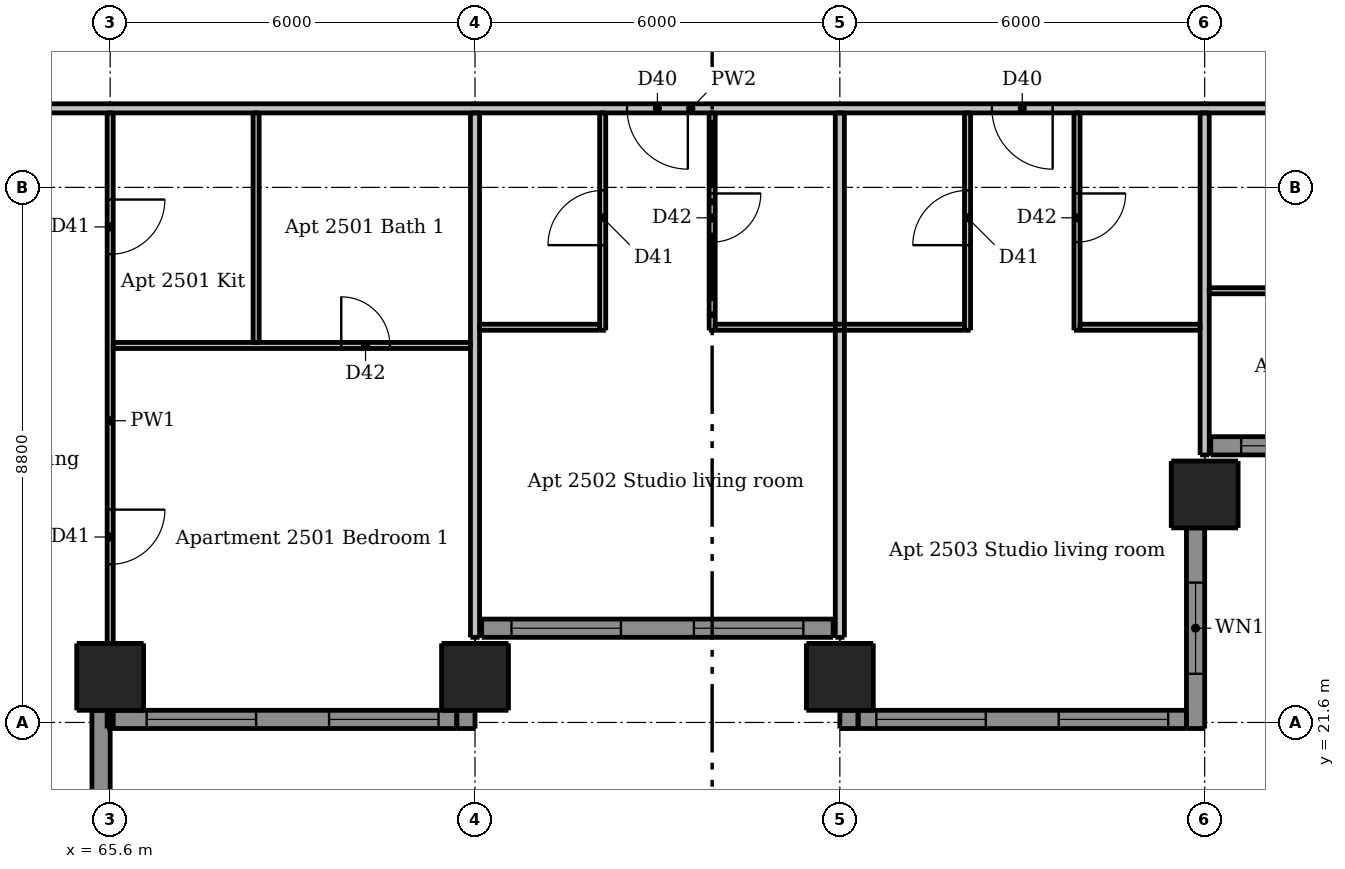
"""IFC4 building model, lengths in metres.
Left out: names, types, materials, properties, quantities, classifications, styles, units other than length and angle.
Written with IfcOpenShell. Run it as: python <this file> out.ifc"""

import sys

from ifc_helpers import new_model, si_unit, direction, frame, frame_2d, origin, origin_2d, place, context, subcontext, project, spatial, rectangle, extrude, element, fill, save


model = new_model("IFC4")
c1 = context("Model", 3, precision=1e-05, world=origin(), true_north=direction((0.0, 1.0)))
c2 = subcontext(c1, "Body", "Model", "MODEL_VIEW")
j1 = project(units=[si_unit("LENGTHUNIT", "METRE"), si_unit("PLANEANGLEUNIT", "RADIAN")], contexts=[c1])
p1 = place(None, origin())
s1 = spatial("IfcSite", under=j1, at=p1, CompositionType="ELEMENT")
p2 = place(p1, origin())
s2 = spatial("IfcBuilding", under=s1, at=p2, CompositionType="ELEMENT")
p3 = place(p2, frame((0.0, 0.0, 95.2)))
s3 = spatial("IfcBuildingStorey", under=s2, at=p3, CompositionType="ELEMENT", Elevation=95.2)
for number, where, z_axis, x_axis in (
    (1, (65.6, 22.35, 0.0), (0.0, 0.0, 1.0), (1.0, 0.0, 0.0)),
    (2, (71.6, 22.35, 0.0), (0.0, 0.0, 1.0), (1.0, 0.0, 0.0)),
    (3, (77.6, 22.35, 0.0), (0.0, 0.0, 1.0), (1.0, 0.0, 0.0)),
    (4, (83.6, 25.35, 0.0), (0.0, 0.0, 1.0), (1.0, 0.0, 0.0)),
):
    element("IfcColumn", number, at=place(p3, frame(where, z_axis=z_axis, x_axis=x_axis)), inside=s3, PredefinedType="COLUMN", context=c2, shape_type="SweptSolid", body=[
        extrude(rectangle(XDim=1.1, YDim=1.1, at=origin_2d()), origin(), (0.0, 0.0, 1.0), 3.05),
    ])
p4 = place(p3, frame((65.45, 20.0, 0.0), z_axis=(0.0, 0.0, 1.0), x_axis=(0.0, 1.0, 0.0)))
e5 = element("IfcWall", 5, at=p4, inside=s3, PredefinedType="SOLIDWALL", context=c2, shape_type="SweptSolid", body=[
    extrude(rectangle(XDim=1.8, YDim=0.3, at=frame_2d((0.9, 0.0))), origin(), (0.0, 0.0, 1.0), 3.05),
])
for number, where, z_axis, x_axis in (
    (6, (71.45, 21.5, 0.0), (0.0, 0.0, 1.0), (0.0, 1.0, 0.0)),
    (7, (77.75, 21.8, 0.0), (0.0, 0.0, 1.0), (0.0, -1.0, 0.0)),
):
    element("IfcWall", number, at=place(p3, frame(where, z_axis=z_axis, x_axis=x_axis)), inside=s3, PredefinedType="SOLIDWALL", context=c2, shape_type="SweptSolid", body=[
        extrude(rectangle(XDim=0.3, YDim=0.3, at=frame_2d((0.15, 0.0))), origin(), (0.0, 0.0, 1.0), 3.05),
    ])
p5 = place(p3, frame((83.45, 21.5, 0.0), z_axis=(0.0, 0.0, 1.0), x_axis=(0.0, 1.0, 0.0)))
e8 = element("IfcWall", 8, at=p5, inside=s3, PredefinedType="SOLIDWALL", context=c2, shape_type="SweptSolid", body=[
    extrude(rectangle(XDim=3.3, YDim=0.3, at=frame_2d((1.65, 0.0))), origin(), (0.0, 0.0, 1.0), 3.05),
])
p6 = place(p5, frame((0.9, 0.0, 0.9)))
e9 = element("IfcOpeningElement", 9, at=p6, cuts=e8, PredefinedType="OPENING", context=c2, shape_type="SweptSolid", body=[
    extrude(rectangle(XDim=1.5, YDim=1.5, at=frame_2d((0.75, 0.75))), frame((0.0, 0.16, 0.0), z_axis=(0.0, -1.0, 0.0), x_axis=(1.0, 0.0, 0.0)), (0.0, 0.0, 1.0), 0.32),
])
p7 = place(p3, frame((65.6, 21.65, 0.0), z_axis=(0.0, 0.0, 1.0), x_axis=(1.0, 0.0, 0.0)))
e10 = element("IfcWall", 10, at=p7, inside=s3, PredefinedType="SOLIDWALL", context=c2, shape_type="SweptSolid", body=[
    extrude(rectangle(XDim=5.7, YDim=0.3, at=frame_2d((2.85, 0.0))), origin(), (0.0, 0.0, 1.0), 3.05),
])
p8 = place(p7, frame((0.6, 0.0, 0.15)))
e11 = element("IfcOpeningElement", 11, at=p8, cuts=e10, PredefinedType="OPENING", context=c2, shape_type="SweptSolid", body=[
    extrude(rectangle(XDim=1.8, YDim=2.1, at=frame_2d((0.9, 1.05))), frame((0.0, 0.16, 0.0), z_axis=(0.0, -1.0, 0.0), x_axis=(1.0, 0.0, 0.0)), (0.0, 0.0, 1.0), 0.32),
])
p9 = place(p7, frame((3.6, 0.0, 0.15)))
e12 = element("IfcOpeningElement", 12, at=p9, cuts=e10, PredefinedType="OPENING", context=c2, shape_type="SweptSolid", body=[
    extrude(rectangle(XDim=1.8, YDim=2.1, at=frame_2d((0.9, 1.05))), frame((0.0, 0.16, 0.0), z_axis=(0.0, -1.0, 0.0), x_axis=(1.0, 0.0, 0.0)), (0.0, 0.0, 1.0), 0.32),
])
p10 = place(p3, frame((71.71, 23.15, 0.0), z_axis=(0.0, 0.0, 1.0), x_axis=(1.0, 0.0, 0.0)))
e13 = element("IfcWall", 13, at=p10, inside=s3, PredefinedType="SOLIDWALL", context=c2, shape_type="SweptSolid", body=[
    extrude(rectangle(XDim=5.78, YDim=0.3, at=frame_2d((2.89, 0.0))), origin(), (0.0, 0.0, 1.0), 3.05),
])
p11 = place(p10, frame((0.49, 0.0, 0.15)))
e14 = element("IfcOpeningElement", 14, at=p11, cuts=e13, PredefinedType="OPENING", context=c2, shape_type="SweptSolid", body=[
    extrude(rectangle(XDim=1.8, YDim=2.1, at=frame_2d((0.9, 1.05))), frame((0.0, 0.16, 0.0), z_axis=(0.0, -1.0, 0.0), x_axis=(1.0, 0.0, 0.0)), (0.0, 0.0, 1.0), 0.32),
])
p12 = place(p10, frame((3.49, 0.0, 0.15)))
e15 = element("IfcOpeningElement", 15, at=p12, cuts=e13, PredefinedType="OPENING", context=c2, shape_type="SweptSolid", body=[
    extrude(rectangle(XDim=1.8, YDim=2.1, at=frame_2d((0.9, 1.05))), frame((0.0, 0.16, 0.0), z_axis=(0.0, -1.0, 0.0), x_axis=(1.0, 0.0, 0.0)), (0.0, 0.0, 1.0), 0.32),
])
p13 = place(p3, frame((77.9, 21.65, 0.0), z_axis=(0.0, 0.0, 1.0), x_axis=(1.0, 0.0, 0.0)))
e16 = element("IfcWall", 16, at=p13, inside=s3, PredefinedType="SOLIDWALL", context=c2, shape_type="SweptSolid", body=[
    extrude(rectangle(XDim=5.4, YDim=0.3, at=frame_2d((2.7, 0.0))), origin(), (0.0, 0.0, 1.0), 3.05),
])
p14 = place(p13, frame((0.3, 0.0, 0.15)))
e17 = element("IfcOpeningElement", 17, at=p14, cuts=e16, PredefinedType="OPENING", context=c2, shape_type="SweptSolid", body=[
    extrude(rectangle(XDim=1.8, YDim=2.1, at=frame_2d((0.9, 1.05))), frame((0.0, 0.16, 0.0), z_axis=(0.0, -1.0, 0.0), x_axis=(1.0, 0.0, 0.0)), (0.0, 0.0, 1.0), 0.32),
])
p15 = place(p13, frame((3.3, 0.0, 0.15)))
e18 = element("IfcOpeningElement", 18, at=p15, cuts=e16, PredefinedType="OPENING", context=c2, shape_type="SweptSolid", body=[
    extrude(rectangle(XDim=1.8, YDim=2.1, at=frame_2d((0.9, 1.05))), frame((0.0, 0.16, 0.0), z_axis=(0.0, -1.0, 0.0), x_axis=(1.0, 0.0, 0.0)), (0.0, 0.0, 1.0), 0.32),
])
p16 = place(p3, frame((83.7, 26.15, 0.0), z_axis=(0.0, 0.0, 1.0), x_axis=(1.0, 0.0, 0.0)))
e19 = element("IfcWall", 19, at=p16, inside=s3, PredefinedType="SOLIDWALL", context=c2, shape_type="SweptSolid", body=[
    extrude(rectangle(XDim=5.79, YDim=0.3, at=frame_2d((2.895, 0.0))), origin(), (0.0, 0.0, 1.0), 3.05),
])
p17 = place(p16, frame((0.5, 0.0, 0.15)))
e20 = element("IfcOpeningElement", 20, at=p17, cuts=e19, PredefinedType="OPENING", context=c2, shape_type="SweptSolid", body=[
    extrude(rectangle(XDim=1.8, YDim=2.1, at=frame_2d((0.9, 1.05))), frame((0.0, 0.16, 0.0), z_axis=(0.0, -1.0, 0.0), x_axis=(1.0, 0.0, 0.0)), (0.0, 0.0, 1.0), 0.32),
])
p18 = place(p16, frame((3.5, 0.0, 0.15)))
e21 = element("IfcOpeningElement", 21, at=p18, cuts=e19, PredefinedType="OPENING", context=c2, shape_type="SweptSolid", body=[
    extrude(rectangle(XDim=1.8, YDim=2.1, at=frame_2d((0.9, 1.05))), frame((0.0, 0.16, 0.0), z_axis=(0.0, -1.0, 0.0), x_axis=(1.0, 0.0, 0.0)), (0.0, 0.0, 1.0), 0.32),
])
p19 = place(p3, frame((65.6, 31.625, 0.0), z_axis=(0.0, 0.0, 1.0), x_axis=(0.0, -1.0, 0.0)))
e22 = element("IfcWall", 22, at=p19, inside=s3, PredefinedType="PARTITIONING", context=c2, shape_type="SweptSolid", body=[
    extrude(rectangle(XDim=10.125, YDim=0.1, at=frame_2d((5.062, 0.0))), origin(), (0.0, 0.0, 1.0), 2.516),
])
p20 = place(p19, frame((1.425, 0.0, 0.0)))
e23 = element("IfcOpeningElement", 23, at=p20, cuts=e22, PredefinedType="OPENING", context=c2, shape_type="SweptSolid", body=[
    extrude(rectangle(XDim=0.9, YDim=2.1, at=frame_2d((0.45, 1.05))), frame((0.0, 0.06, 0.0), z_axis=(0.0, -1.0, 0.0), x_axis=(1.0, 0.0, 0.0)), (0.0, 0.0, 1.0), 0.12),
])
p21 = place(p19, frame((6.525, 0.0, 0.0)))
e24 = element("IfcOpeningElement", 24, at=p21, cuts=e22, PredefinedType="OPENING", context=c2, shape_type="SweptSolid", body=[
    extrude(rectangle(XDim=0.9, YDim=2.1, at=frame_2d((0.45, 1.05))), frame((0.0, 0.06, 0.0), z_axis=(0.0, -1.0, 0.0), x_axis=(1.0, 0.0, 0.0)), (0.0, 0.0, 1.0), 0.12),
])
p22 = place(p3, frame((68.0, 27.85, 0.0), z_axis=(0.0, 0.0, 1.0), x_axis=(0.0, 1.0, 0.0)))
e25 = element("IfcWall", 25, at=p22, inside=s3, PredefinedType="PARTITIONING", context=c2, shape_type="SweptSolid", body=[
    extrude(rectangle(XDim=3.775, YDim=0.1, at=frame_2d((1.887, 0.0))), origin(), (0.0, 0.0, 1.0), 3.05),
])
p23 = place(p3, frame((73.7, 28.05, 0.0), z_axis=(0.0, 0.0, 1.0), x_axis=(0.0, 1.0, 0.0)))
e26 = element("IfcWall", 26, at=p23, inside=s3, PredefinedType="PARTITIONING", context=c2, shape_type="SweptSolid", body=[
    extrude(rectangle(XDim=3.575, YDim=0.1, at=frame_2d((1.788, 0.0))), origin(), (0.0, 0.0, 1.0), 3.05),
])
p24 = place(p23, frame((1.4, 0.0, 0.0)))
e27 = element("IfcOpeningElement", 27, at=p24, cuts=e26, PredefinedType="OPENING", context=c2, shape_type="SweptSolid", body=[
    extrude(rectangle(XDim=0.9, YDim=2.1, at=frame_2d((0.45, 1.05))), frame((0.0, 0.06, 0.0), z_axis=(0.0, -1.0, 0.0), x_axis=(1.0, 0.0, 0.0)), (0.0, 0.0, 1.0), 0.12),
])
p25 = place(p3, frame((75.5, 31.625, 0.0), z_axis=(0.0, 0.0, 1.0), x_axis=(0.0, -1.0, 0.0)))
e28 = element("IfcWall", 28, at=p25, inside=s3, PredefinedType="PARTITIONING", context=c2, shape_type="SweptSolid", body=[
    extrude(rectangle(XDim=3.575, YDim=0.1, at=frame_2d((1.788, 0.0))), origin(), (0.0, 0.0, 1.0), 3.05),
])
p26 = place(p25, frame((1.325, 0.0, 0.0)))
e29 = element("IfcOpeningElement", 29, at=p26, cuts=e28, PredefinedType="OPENING", context=c2, shape_type="SweptSolid", body=[
    extrude(rectangle(XDim=0.8, YDim=2.1, at=frame_2d((0.4, 1.05))), frame((0.0, 0.06, 0.0), z_axis=(0.0, -1.0, 0.0), x_axis=(1.0, 0.0, 0.0)), (0.0, 0.0, 1.0), 0.12),
])
p27 = place(p3, frame((79.7, 28.05, 0.0), z_axis=(0.0, 0.0, 1.0), x_axis=(0.0, 1.0, 0.0)))
e30 = element("IfcWall", 30, at=p27, inside=s3, PredefinedType="PARTITIONING", context=c2, shape_type="SweptSolid", body=[
    extrude(rectangle(XDim=3.575, YDim=0.1, at=frame_2d((1.788, 0.0))), origin(), (0.0, 0.0, 1.0), 3.05),
])
p28 = place(p27, frame((1.4, 0.0, 0.0)))
e31 = element("IfcOpeningElement", 31, at=p28, cuts=e30, PredefinedType="OPENING", context=c2, shape_type="SweptSolid", body=[
    extrude(rectangle(XDim=0.9, YDim=2.1, at=frame_2d((0.45, 1.05))), frame((0.0, 0.06, 0.0), z_axis=(0.0, -1.0, 0.0), x_axis=(1.0, 0.0, 0.0)), (0.0, 0.0, 1.0), 0.12),
])
p29 = place(p3, frame((81.5, 31.625, 0.0), z_axis=(0.0, 0.0, 1.0), x_axis=(0.0, -1.0, 0.0)))
e32 = element("IfcWall", 32, at=p29, inside=s3, PredefinedType="PARTITIONING", context=c2, shape_type="SweptSolid", body=[
    extrude(rectangle(XDim=3.575, YDim=0.1, at=frame_2d((1.788, 0.0))), origin(), (0.0, 0.0, 1.0), 3.05),
])
p30 = place(p29, frame((1.325, 0.0, 0.0)))
e33 = element("IfcOpeningElement", 33, at=p30, cuts=e32, PredefinedType="OPENING", context=c2, shape_type="SweptSolid", body=[
    extrude(rectangle(XDim=0.8, YDim=2.1, at=frame_2d((0.4, 1.05))), frame((0.0, 0.06, 0.0), z_axis=(0.0, -1.0, 0.0), x_axis=(1.0, 0.0, 0.0)), (0.0, 0.0, 1.0), 0.12),
])
for number, where, z_axis, x_axis in (
    (34, (83.675, 28.7, 0.0), (0.0, 0.0, 1.0), (1.0, 0.0, 0.0)),
    (35, (71.675, 28.1, 0.0), (0.0, 0.0, 1.0), (1.0, 0.0, 0.0)),
):
    element("IfcWall", number, at=place(p3, frame(where, z_axis=z_axis, x_axis=x_axis)), inside=s3, PredefinedType="PARTITIONING", context=c2, shape_type="SweptSolid", body=[
        extrude(rectangle(XDim=1.975, YDim=0.1, at=frame_2d((0.987, 0.0))), origin(), (0.0, 0.0, 1.0), 3.05),
    ])
p31 = place(p3, frame((75.55, 28.1, 0.0), z_axis=(0.0, 0.0, 1.0), x_axis=(1.0, 0.0, 0.0)))
e36 = element("IfcWall", 36, at=p31, inside=s3, PredefinedType="PARTITIONING", context=c2, shape_type="SweptSolid", body=[
    extrude(rectangle(XDim=4.1, YDim=0.1, at=frame_2d((2.05, 0.0))), origin(), (0.0, 0.0, 1.0), 3.05),
])
p32 = place(p3, frame((81.55, 28.1, 0.0), z_axis=(0.0, 0.0, 1.0), x_axis=(1.0, 0.0, 0.0)))
e37 = element("IfcWall", 37, at=p32, inside=s3, PredefinedType="PARTITIONING", context=c2, shape_type="SweptSolid", body=[
    extrude(rectangle(XDim=1.975, YDim=0.1, at=frame_2d((0.987, 0.0))), origin(), (0.0, 0.0, 1.0), 3.05),
])
p33 = place(p3, frame((65.65, 27.8, 0.0), z_axis=(0.0, 0.0, 1.0), x_axis=(1.0, 0.0, 0.0)))
e38 = element("IfcWall", 38, at=p33, inside=s3, PredefinedType="PARTITIONING", context=c2, shape_type="SweptSolid", body=[
    extrude(rectangle(XDim=5.875, YDim=0.1, at=frame_2d((2.938, 0.0))), origin(), (0.0, 0.0, 1.0), 3.05),
])
p34 = place(p33, frame((3.75, 0.0, 0.0)))
e39 = element("IfcOpeningElement", 39, at=p34, cuts=e38, PredefinedType="OPENING", context=c2, shape_type="SweptSolid", body=[
    extrude(rectangle(XDim=0.8, YDim=2.1, at=frame_2d((0.4, 1.05))), frame((0.0, 0.06, 0.0), z_axis=(0.0, -1.0, 0.0), x_axis=(1.0, 0.0, 0.0)), (0.0, 0.0, 1.0), 0.12),
])
for number, where, z_axis, x_axis in (
    (40, (71.6, 23.0, 0.0), (0.0, 0.0, 1.0), (0.0, 1.0, 0.0)),
    (41, (77.6, 23.0, 0.0), (0.0, 0.0, 1.0), (0.0, 1.0, 0.0)),
):
    element("IfcWall", number, at=place(p3, frame(where, z_axis=z_axis, x_axis=x_axis)), inside=s3, PredefinedType="PARTITIONING", context=c2, shape_type="SweptSolid", body=[
        extrude(rectangle(XDim=8.625, YDim=0.15, at=frame_2d((4.312, 0.0))), origin(), (0.0, 0.0, 1.0), 2.516),
    ])
p35 = place(p3, frame((83.6, 26.0, 0.0), z_axis=(0.0, 0.0, 1.0), x_axis=(0.0, 1.0, 0.0)))
e42 = element("IfcWall", 42, at=p35, inside=s3, PredefinedType="PARTITIONING", context=c2, shape_type="SweptSolid", body=[
    extrude(rectangle(XDim=5.625, YDim=0.15, at=frame_2d((2.812, 0.0))), origin(), (0.0, 0.0, 1.0), 2.589),
])
p36 = place(p3, frame((89.525, 31.7, 0.0), z_axis=(0.0, 0.0, 1.0), x_axis=(-1.0, 0.0, 0.0)))
e43 = element("IfcWall", 43, at=p36, inside=s3, PredefinedType="PARTITIONING", context=c2, shape_type="SweptSolid", body=[
    extrude(rectangle(XDim=28.75, YDim=0.15, at=frame_2d((14.375, 0.0))), origin(), (0.0, 0.0, 1.0), 3.05),
])
p37 = place(p36, frame((25.875, 0.0, 0.0)))
e44 = element("IfcOpeningElement", 44, at=p37, cuts=e43, PredefinedType="OPENING", context=c2, shape_type="SweptSolid", body=[
    extrude(rectangle(XDim=1.0, YDim=2.1, at=frame_2d((0.5, 1.05))), frame((0.0, 0.085, 0.0), z_axis=(0.0, -1.0, 0.0), x_axis=(1.0, 0.0, 0.0)), (0.0, 0.0, 1.0), 0.17),
])
p38 = place(p36, frame((14.425, 0.0, 0.0)))
e45 = element("IfcOpeningElement", 45, at=p38, cuts=e43, PredefinedType="OPENING", context=c2, shape_type="SweptSolid", body=[
    extrude(rectangle(XDim=1.0, YDim=2.1, at=frame_2d((0.5, 1.05))), frame((0.0, 0.085, 0.0), z_axis=(0.0, -1.0, 0.0), x_axis=(1.0, 0.0, 0.0)), (0.0, 0.0, 1.0), 0.17),
])
p39 = place(p36, frame((8.425, 0.0, 0.0)))
e46 = element("IfcOpeningElement", 46, at=p39, cuts=e43, PredefinedType="OPENING", context=c2, shape_type="SweptSolid", body=[
    extrude(rectangle(XDim=1.0, YDim=2.1, at=frame_2d((0.5, 1.05))), frame((0.0, 0.085, 0.0), z_axis=(0.0, -1.0, 0.0), x_axis=(1.0, 0.0, 0.0)), (0.0, 0.0, 1.0), 0.17),
])
p40 = place(p36, frame((2.425, 0.0, 0.0)))
e47 = element("IfcOpeningElement", 47, at=p40, cuts=e43, PredefinedType="OPENING", context=c2, shape_type="SweptSolid", body=[
    extrude(rectangle(XDim=1.0, YDim=2.1, at=frame_2d((0.5, 1.05))), frame((0.0, 0.085, 0.0), z_axis=(0.0, -1.0, 0.0), x_axis=(1.0, 0.0, 0.0)), (0.0, 0.0, 1.0), 0.17),
])
p41 = place(p6, origin())
e48 = element("IfcWindow", 48, at=p41, inside=s3, PartitioningType="DOUBLE_PANEL_VERTICAL", PredefinedType="WINDOW", context=c2, shape_type="SweptSolid", body=[
    extrude(rectangle(XDim=1.5, YDim=1.5, at=frame_2d((0.75, 0.75))), frame((0.0, 0.03, 0.0), z_axis=(0.0, -1.0, 0.0), x_axis=(1.0, 0.0, 0.0)), (0.0, 0.0, 1.0), 0.06),
])
fill(e9, e48)
p42 = place(p8, origin())
e49 = element("IfcWindow", 49, at=p42, inside=s3, PartitioningType="DOUBLE_PANEL_VERTICAL", PredefinedType="WINDOW", context=c2, shape_type="SweptSolid", body=[
    extrude(rectangle(XDim=1.8, YDim=2.1, at=frame_2d((0.9, 1.05))), frame((0.0, 0.03, 0.0), z_axis=(0.0, -1.0, 0.0), x_axis=(1.0, 0.0, 0.0)), (0.0, 0.0, 1.0), 0.06),
])
fill(e11, e49)
p43 = place(p9, origin())
e50 = element("IfcWindow", 50, at=p43, inside=s3, PartitioningType="DOUBLE_PANEL_VERTICAL", PredefinedType="WINDOW", context=c2, shape_type="SweptSolid", body=[
    extrude(rectangle(XDim=1.8, YDim=2.1, at=frame_2d((0.9, 1.05))), frame((0.0, 0.03, 0.0), z_axis=(0.0, -1.0, 0.0), x_axis=(1.0, 0.0, 0.0)), (0.0, 0.0, 1.0), 0.06),
])
fill(e12, e50)
p44 = place(p11, origin())
e51 = element("IfcWindow", 51, at=p44, inside=s3, PartitioningType="DOUBLE_PANEL_VERTICAL", PredefinedType="WINDOW", context=c2, shape_type="SweptSolid", body=[
    extrude(rectangle(XDim=1.8, YDim=2.1, at=frame_2d((0.9, 1.05))), frame((0.0, 0.03, 0.0), z_axis=(0.0, -1.0, 0.0), x_axis=(1.0, 0.0, 0.0)), (0.0, 0.0, 1.0), 0.06),
])
fill(e14, e51)
p45 = place(p12, origin())
e52 = element("IfcWindow", 52, at=p45, inside=s3, PartitioningType="DOUBLE_PANEL_VERTICAL", PredefinedType="WINDOW", context=c2, shape_type="SweptSolid", body=[
    extrude(rectangle(XDim=1.8, YDim=2.1, at=frame_2d((0.9, 1.05))), frame((0.0, 0.03, 0.0), z_axis=(0.0, -1.0, 0.0), x_axis=(1.0, 0.0, 0.0)), (0.0, 0.0, 1.0), 0.06),
])
fill(e15, e52)
p46 = place(p14, origin())
e53 = element("IfcWindow", 53, at=p46, inside=s3, PartitioningType="DOUBLE_PANEL_VERTICAL", PredefinedType="WINDOW", context=c2, shape_type="SweptSolid", body=[
    extrude(rectangle(XDim=1.8, YDim=2.1, at=frame_2d((0.9, 1.05))), frame((0.0, 0.03, 0.0), z_axis=(0.0, -1.0, 0.0), x_axis=(1.0, 0.0, 0.0)), (0.0, 0.0, 1.0), 0.06),
])
fill(e17, e53)
p47 = place(p15, origin())
e54 = element("IfcWindow", 54, at=p47, inside=s3, PartitioningType="DOUBLE_PANEL_VERTICAL", PredefinedType="WINDOW", context=c2, shape_type="SweptSolid", body=[
    extrude(rectangle(XDim=1.8, YDim=2.1, at=frame_2d((0.9, 1.05))), frame((0.0, 0.03, 0.0), z_axis=(0.0, -1.0, 0.0), x_axis=(1.0, 0.0, 0.0)), (0.0, 0.0, 1.0), 0.06),
])
fill(e18, e54)
p48 = place(p17, origin())
e55 = element("IfcWindow", 55, at=p48, inside=s3, PartitioningType="DOUBLE_PANEL_VERTICAL", PredefinedType="WINDOW", context=c2, shape_type="SweptSolid", body=[
    extrude(rectangle(XDim=1.8, YDim=2.1, at=frame_2d((0.9, 1.05))), frame((0.0, 0.03, 0.0), z_axis=(0.0, -1.0, 0.0), x_axis=(1.0, 0.0, 0.0)), (0.0, 0.0, 1.0), 0.06),
])
fill(e20, e55)
p49 = place(p20, origin())
e56 = element("IfcDoor", 56, at=p49, inside=s3, OperationType="SINGLE_SWING_LEFT", PredefinedType="DOOR", context=c2, shape_type="SweptSolid", body=[
    extrude(rectangle(XDim=0.9, YDim=2.1, at=frame_2d((0.45, 1.05))), frame((0.0, 0.025, 0.0), z_axis=(0.0, -1.0, 0.0), x_axis=(1.0, 0.0, 0.0)), (0.0, 0.0, 1.0), 0.05),
])
fill(e23, e56)
p50 = place(p21, origin())
e57 = element("IfcDoor", 57, at=p50, inside=s3, OperationType="SINGLE_SWING_LEFT", PredefinedType="DOOR", context=c2, shape_type="SweptSolid", body=[
    extrude(rectangle(XDim=0.9, YDim=2.1, at=frame_2d((0.45, 1.05))), frame((0.0, 0.025, 0.0), z_axis=(0.0, -1.0, 0.0), x_axis=(1.0, 0.0, 0.0)), (0.0, 0.0, 1.0), 0.05),
])
fill(e24, e57)
p51 = place(p34, origin())
e58 = element("IfcDoor", 58, at=p51, inside=s3, OperationType="SINGLE_SWING_LEFT", PredefinedType="DOOR", context=c2, shape_type="SweptSolid", body=[
    extrude(rectangle(XDim=0.8, YDim=2.1, at=frame_2d((0.4, 1.05))), frame((0.0, 0.025, 0.0), z_axis=(0.0, -1.0, 0.0), x_axis=(1.0, 0.0, 0.0)), (0.0, 0.0, 1.0), 0.05),
])
fill(e39, e58)
p52 = place(p38, origin())
e59 = element("IfcDoor", 59, at=p52, inside=s3, OperationType="SINGLE_SWING_LEFT", PredefinedType="DOOR", context=c2, shape_type="SweptSolid", body=[
    extrude(rectangle(XDim=1.0, YDim=2.1, at=frame_2d((0.5, 1.05))), frame((0.0, 0.025, 0.0), z_axis=(0.0, -1.0, 0.0), x_axis=(1.0, 0.0, 0.0)), (0.0, 0.0, 1.0), 0.05),
])
fill(e45, e59)
p53 = place(p24, origin())
e60 = element("IfcDoor", 60, at=p53, inside=s3, OperationType="SINGLE_SWING_LEFT", PredefinedType="DOOR", context=c2, shape_type="SweptSolid", body=[
    extrude(rectangle(XDim=0.9, YDim=2.1, at=frame_2d((0.45, 1.05))), frame((0.0, 0.025, 0.0), z_axis=(0.0, -1.0, 0.0), x_axis=(1.0, 0.0, 0.0)), (0.0, 0.0, 1.0), 0.05),
])
fill(e27, e60)
p54 = place(p26, origin())
e61 = element("IfcDoor", 61, at=p54, inside=s3, OperationType="SINGLE_SWING_LEFT", PredefinedType="DOOR", context=c2, shape_type="SweptSolid", body=[
    extrude(rectangle(XDim=0.8, YDim=2.1, at=frame_2d((0.4, 1.05))), frame((0.0, 0.025, 0.0), z_axis=(0.0, -1.0, 0.0), x_axis=(1.0, 0.0, 0.0)), (0.0, 0.0, 1.0), 0.05),
])
fill(e29, e61)
p55 = place(p39, origin())
e62 = element("IfcDoor", 62, at=p55, inside=s3, OperationType="SINGLE_SWING_LEFT", PredefinedType="DOOR", context=c2, shape_type="SweptSolid", body=[
    extrude(rectangle(XDim=1.0, YDim=2.1, at=frame_2d((0.5, 1.05))), frame((0.0, 0.025, 0.0), z_axis=(0.0, -1.0, 0.0), x_axis=(1.0, 0.0, 0.0)), (0.0, 0.0, 1.0), 0.05),
])
fill(e46, e62)
p56 = place(p28, origin())
e63 = element("IfcDoor", 63, at=p56, inside=s3, OperationType="SINGLE_SWING_LEFT", PredefinedType="DOOR", context=c2, shape_type="SweptSolid", body=[
    extrude(rectangle(XDim=0.9, YDim=2.1, at=frame_2d((0.45, 1.05))), frame((0.0, 0.025, 0.0), z_axis=(0.0, -1.0, 0.0), x_axis=(1.0, 0.0, 0.0)), (0.0, 0.0, 1.0), 0.05),
])
fill(e31, e63)
p57 = place(p30, origin())
e64 = element("IfcDoor", 64, at=p57, inside=s3, OperationType="SINGLE_SWING_LEFT", PredefinedType="DOOR", context=c2, shape_type="SweptSolid", body=[
    extrude(rectangle(XDim=0.8, YDim=2.1, at=frame_2d((0.4, 1.05))), frame((0.0, 0.025, 0.0), z_axis=(0.0, -1.0, 0.0), x_axis=(1.0, 0.0, 0.0)), (0.0, 0.0, 1.0), 0.05),
])
fill(e33, e64)
save(model, sys.argv[1])
